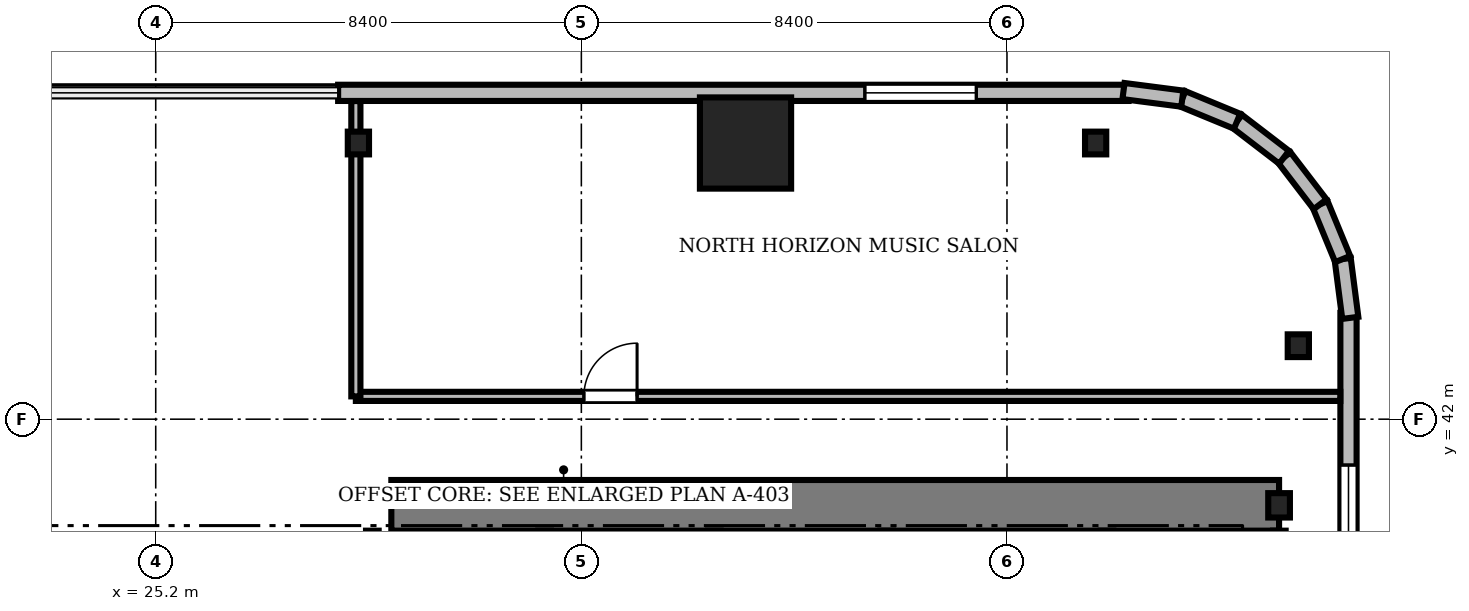
"""IFC4 building model, lengths in metres.
Left out: names, types, materials, properties, quantities, classifications, styles, units other than length and angle.
Written with IfcOpenShell. Run it as: python <this file> out.ifc"""

import sys

from ifc_helpers import new_model, si_unit, direction, frame, frame_2d, origin, origin_2d, place, context, subcontext, project, spatial, rectangle, i_section, extrude, source, transform, mapped, element, fill, save


model = new_model("IFC4")
c1 = context("Model", 3, precision=1e-05, world=origin(), true_north=direction((0.0, 1.0)))
c2 = subcontext(c1, "Body", "Model", "MODEL_VIEW")
j1 = project(units=[si_unit("LENGTHUNIT", "METRE"), si_unit("PLANEANGLEUNIT", "RADIAN")], contexts=[c1])
p1 = place(None, origin())
s1 = spatial("IfcSite", under=j1, at=p1, CompositionType="ELEMENT")
p2 = place(p1, origin())
s2 = spatial("IfcBuilding", under=s1, at=p2, CompositionType="ELEMENT")
p3 = place(p2, frame((0.0, 0.0, 60.45)))
s3 = spatial("IfcBuildingStorey", under=s2, at=p3, CompositionType="ELEMENT", Elevation=60.45)
m1 = source(origin(), c2, "Body", "SweptSolid", [
    extrude(rectangle(XDim=17.52, YDim=1.0, at=frame_2d((8.76, 0.0))), origin(), (0.0, 0.0, 1.0), 3.41),
])
p4 = place(p3, frame((29.85, 40.3, 0.0), z_axis=(0.0, 0.0, 1.0), x_axis=(1.0, 0.0, 0.0)))
e1 = element("IfcWall", 1, at=p4, inside=s3, PredefinedType="SHEAR", context=c2, shape_type="MappedRepresentation", body=[
    mapped(m1, transform((0.0, 0.0, 0.0), scale=1.0)),
])
m2 = source(origin(), c2, "Body", "SweptSolid", [
    extrude(i_section(OverallWidth=0.428, OverallDepth=0.481, WebThickness=0.04, FlangeThickness=0.063, FilletRadius=0.015, at=origin_2d()), origin(), (0.0, 0.0, 1.0), 3.41),
])
p5 = place(p3, frame((47.37, 40.3, 0.0), z_axis=(0.0, 0.0, 1.0), x_axis=(1.0, 0.0, 0.0)))
e2 = element("IfcColumn", 2, at=p5, inside=s3, PredefinedType="COLUMN", context=c2, shape_type="MappedRepresentation", body=[
    mapped(m2, transform((0.0, 0.0, 0.0), scale=1.0)),
])
m3 = source(origin(), c2, "Body", "SweptSolid", [
    extrude(rectangle(XDim=1.8, YDim=1.8, at=origin_2d()), origin(), (0.0, 0.0, 1.0), 3.41),
])
p6 = place(p3, frame((36.84, 47.45, 0.0), z_axis=(0.0, 0.0, 1.0), x_axis=(1.0, 0.0, 0.0)))
e3 = element("IfcColumn", 3, at=p6, inside=s3, PredefinedType="COLUMN", context=c2, shape_type="MappedRepresentation", body=[
    mapped(m3, transform((0.0, 0.0, 0.0), scale=1.0)),
])
m4 = source(origin(), c2, "Body", "SweptSolid", [
    extrude(i_section(OverallWidth=0.419, OverallDepth=0.449, WebThickness=0.031, FlangeThickness=0.048, FilletRadius=0.015, at=origin_2d()), origin(), (0.0, 0.0, 1.0), 3.41),
])
for number, where, z_axis, x_axis in (
    (4, (47.75, 43.45, 0.0), (0.0, 0.0, 1.0), (1.0, 0.0, 0.0)),
    (5, (43.75, 47.45, 0.0), (0.0, 0.0, 1.0), (1.0, 0.0, 0.0)),
    (6, (29.2, 47.45, 0.0), (0.0, 0.0, 1.0), (1.0, 0.0, 0.0)),
):
    element("IfcColumn", number, at=place(p3, frame(where, z_axis=z_axis, x_axis=x_axis)), inside=s3, PredefinedType="COLUMN", context=c2, shape_type="MappedRepresentation", body=[
        mapped(m4, transform((0.0, 0.0, 0.0), scale=1.0)),
    ])
m5 = source(origin(), c2, "Body", "SweptSolid", [
    extrude(rectangle(XDim=15.6, YDim=0.32, at=frame_2d((7.8, 0.0))), origin(), (0.0, 0.0, 1.0), 3.41),
])
p7 = place(p3, frame((44.4, 48.44, 0.0), z_axis=(0.0, 0.0, 1.0), x_axis=(-1.0, 0.0, 0.0)))
e7 = element("IfcWall", 7, at=p7, inside=s3, PredefinedType="SOLIDWALL", context=c2, shape_type="MappedRepresentation", body=[
    mapped(m5, transform((0.0, 0.0, 0.0), scale=1.0)),
])
m6 = source(origin(), c2, "Body", "SweptSolid", [
    extrude(rectangle(XDim=2.2, YDim=2.4, at=frame_2d((1.1, 1.2))), frame((0.0, 0.17, 0.0), z_axis=(0.0, -1.0, 0.0), x_axis=(1.0, 0.0, 0.0)), (0.0, 0.0, 1.0), 0.34),
])
p8 = place(p7, frame((3.005, 0.0, 0.72)))
e8 = element("IfcOpeningElement", 8, at=p8, cuts=e7, PredefinedType="OPENING", context=c2, shape_type="MappedRepresentation", body=[
    mapped(m6, transform((0.0, 0.0, 0.0), scale=1.0)),
])
m7 = source(origin(), c2, "Body", "SweptSolid", [
    extrude(rectangle(XDim=15.6, YDim=0.32, at=frame_2d((7.8, 0.0))), origin(), (0.0, 0.0, 1.0), 3.41),
])
p9 = place(p3, frame((48.74, 28.5, 0.0), z_axis=(0.0, 0.0, 1.0), x_axis=(0.0, 1.0, 0.0)))
e9 = element("IfcWall", 9, at=p9, inside=s3, PredefinedType="SOLIDWALL", context=c2, shape_type="MappedRepresentation", body=[
    mapped(m7, transform((0.0, 0.0, 0.0), scale=1.0)),
])
p10 = place(p9, frame((10.395, 0.0, 0.72)))
e10 = element("IfcOpeningElement", 10, at=p10, cuts=e9, PredefinedType="OPENING", context=c2, shape_type="MappedRepresentation", body=[
    mapped(m6, transform((0.0, 0.0, 0.0), scale=1.0)),
])
m8 = source(origin(), c2, "Body", "SweptSolid", [
    extrude(rectangle(XDim=1.17, YDim=0.32, at=frame_2d((0.585, 0.0))), origin(), (0.0, 0.0, 1.0), 3.41),
])
p11 = place(p3, frame((48.776, 44.0, 0.0), z_axis=(0.0, 0.0, 1.0), x_axis=(-0.128295670475, 0.991735963317, 0.0)))
e11 = element("IfcWall", 11, at=p11, inside=s3, PredefinedType="SOLIDWALL", context=c2, shape_type="MappedRepresentation", body=[
    mapped(m8, transform((0.0, 0.0, 0.0), scale=1.0)),
])
m9 = source(origin(), c2, "Body", "SweptSolid", [
    extrude(rectangle(XDim=1.169, YDim=0.32, at=frame_2d((0.584, 0.0))), origin(), (0.0, 0.0, 1.0), 3.41),
])
p12 = place(p3, frame((48.625, 45.16, 0.0), z_axis=(0.0, 0.0, 1.0), x_axis=(-0.381054331552, 0.924552646638, 0.0)))
e12 = element("IfcWall", 12, at=p12, inside=s3, PredefinedType="SOLIDWALL", context=c2, shape_type="MappedRepresentation", body=[
    mapped(m9, transform((0.0, 0.0, 0.0), scale=1.0)),
])
m10 = source(origin(), c2, "Body", "SweptSolid", [
    extrude(rectangle(XDim=1.169, YDim=0.32, at=frame_2d((0.584, 0.0))), origin(), (0.0, 0.0, 1.0), 3.41),
])
p13 = place(p3, frame((48.18, 46.241, 0.0), z_axis=(0.0, 0.0, 1.0), x_axis=(-0.608387696831, 0.793639975269, 0.0)))
e13 = element("IfcWall", 13, at=p13, inside=s3, PredefinedType="SOLIDWALL", context=c2, shape_type="MappedRepresentation", body=[
    mapped(m10, transform((0.0, 0.0, 0.0), scale=1.0)),
])
m11 = source(origin(), c2, "Body", "SweptSolid", [
    extrude(rectangle(XDim=1.169, YDim=0.32, at=frame_2d((0.584, 0.0))), origin(), (0.0, 0.0, 1.0), 3.41),
])
p14 = place(p3, frame((47.469, 47.169, 0.0), z_axis=(0.0, 0.0, 1.0), x_axis=(-0.793663520347, 0.608356981114, 0.0)))
e14 = element("IfcWall", 14, at=p14, inside=s3, PredefinedType="SOLIDWALL", context=c2, shape_type="MappedRepresentation", body=[
    mapped(m11, transform((0.0, 0.0, 0.0), scale=1.0)),
])
p15 = place(p3, frame((46.541, 47.88, 0.0), z_axis=(0.0, 0.0, 1.0), x_axis=(-0.924552646638, 0.381054331552, 0.0)))
e15 = element("IfcWall", 15, at=p15, inside=s3, PredefinedType="SOLIDWALL", context=c2, shape_type="MappedRepresentation", body=[
    mapped(m9, transform((0.0, 0.0, 0.0), scale=1.0)),
])
p16 = place(p3, frame((45.46, 48.325, 0.0), z_axis=(0.0, 0.0, 1.0), x_axis=(-0.991735963317, 0.128295670475, 0.0)))
e16 = element("IfcWall", 16, at=p16, inside=s3, PredefinedType="SOLIDWALL", context=c2, shape_type="MappedRepresentation", body=[
    mapped(m8, transform((0.0, 0.0, 0.0), scale=1.0)),
])
m12 = source(origin(), c2, "Body", "SweptSolid", [
    extrude(rectangle(XDim=9.15, YDim=0.25, at=frame_2d((4.575, 0.0))), origin(), (0.0, 0.0, 1.0), 3.45),
])
for number, where, z_axis, x_axis in (
    (17, (29.475, 30.65, 0.0), (0.0, 0.0, 1.0), (0.0, 1.0, 0.0)),
    (18, (32.875, 30.65, 0.0), (0.0, 0.0, 1.0), (0.0, 1.0, 0.0)),
    (19, (36.225, 30.65, 0.0), (0.0, 0.0, 1.0), (0.0, 1.0, 0.0)),
    (20, (39.625, 30.65, 0.0), (0.0, 0.0, 1.0), (0.0, 1.0, 0.0)),
    (21, (43.975, 30.65, 0.0), (0.0, 0.0, 1.0), (0.0, 1.0, 0.0)),
    (22, (47.375, 30.65, 0.0), (0.0, 0.0, 1.0), (0.0, 1.0, 0.0)),
):
    element("IfcWall", number, at=place(p3, frame(where, z_axis=z_axis, x_axis=x_axis)), inside=s3, PredefinedType="SOLIDWALL", context=c2, shape_type="MappedRepresentation", body=[
        mapped(m12, transform((0.0, 0.0, 0.0), scale=1.0)),
    ])
m13 = source(origin(), c2, "Body", "SweptSolid", [
    extrude(rectangle(XDim=19.428, YDim=0.18, at=frame_2d((9.714, 0.0))), origin(), (0.0, 0.0, 1.0), 2.652),
])
p17 = place(p3, frame((29.15, 42.45, 0.0), z_axis=(0.0, 0.0, 1.0), x_axis=(1.0, 0.0, 0.0)))
e23 = element("IfcWall", 23, at=p17, inside=s3, PredefinedType="PARTITIONING", context=c2, shape_type="MappedRepresentation", body=[
    mapped(m13, transform((0.0, 0.0, 0.0), scale=1.0)),
])
m14 = source(origin(), c2, "Body", "SweptSolid", [
    extrude(rectangle(XDim=1.05, YDim=2.2, at=frame_2d((0.525, 1.1))), frame((0.0, 0.1, 0.0), z_axis=(0.0, -1.0, 0.0), x_axis=(1.0, 0.0, 0.0)), (0.0, 0.0, 1.0), 0.2),
])
p18 = place(p17, frame((4.5, 0.0, 0.0)))
e24 = element("IfcOpeningElement", 24, at=p18, cuts=e23, PredefinedType="OPENING", context=c2, shape_type="MappedRepresentation", body=[
    mapped(m14, transform((0.0, 0.0, 0.0), scale=1.0)),
])
m15 = source(origin(), c2, "Body", "SweptSolid", [
    extrude(rectangle(XDim=5.828, YDim=0.18, at=frame_2d((2.914, 0.0))), origin(), (0.0, 0.0, 1.0), 2.652),
])
p19 = place(p3, frame((29.15, 42.45, 0.0), z_axis=(0.0, 0.0, 1.0), x_axis=(0.0, 1.0, 0.0)))
e25 = element("IfcWall", 25, at=p19, inside=s3, PredefinedType="PARTITIONING", context=c2, shape_type="MappedRepresentation", body=[
    mapped(m15, transform((0.0, 0.0, 0.0), scale=1.0)),
])
m16 = source(origin(), c2, "Body", "SweptSolid", [
    extrude(rectangle(XDim=2.2, YDim=2.4, at=frame_2d((1.1, 1.2))), frame((0.0, 0.03, 0.0), z_axis=(0.0, -1.0, 0.0), x_axis=(1.0, 0.0, 0.0)), (0.0, 0.0, 1.0), 0.06),
])
p20 = place(p8, origin())
e26 = element("IfcWindow", 26, at=p20, inside=s3, PartitioningType="SINGLE_PANEL", PredefinedType="WINDOW", context=c2, shape_type="MappedRepresentation", body=[
    mapped(m16, transform((0.0, 0.0, 0.0), scale=1.0)),
])
fill(e8, e26)
p21 = place(p10, origin())
e27 = element("IfcWindow", 27, at=p21, inside=s3, PartitioningType="SINGLE_PANEL", PredefinedType="WINDOW", context=c2, shape_type="MappedRepresentation", body=[
    mapped(m16, transform((0.0, 0.0, 0.0), scale=1.0)),
])
fill(e10, e27)
m17 = source(origin(), c2, "Body", "SweptSolid", [
    extrude(rectangle(XDim=1.05, YDim=2.2, at=frame_2d((0.525, 1.1))), frame((0.0, 0.025, 0.0), z_axis=(0.0, -1.0, 0.0), x_axis=(1.0, 0.0, 0.0)), (0.0, 0.0, 1.0), 0.05),
])
p22 = place(p18, origin())
e28 = element("IfcDoor", 28, at=p22, inside=s3, OperationType="SINGLE_SWING_RIGHT", PredefinedType="DOOR", context=c2, shape_type="MappedRepresentation", body=[
    mapped(m17, transform((0.0, 0.0, 0.0), scale=1.0)),
])
fill(e24, e28)
save(model, sys.argv[1])
